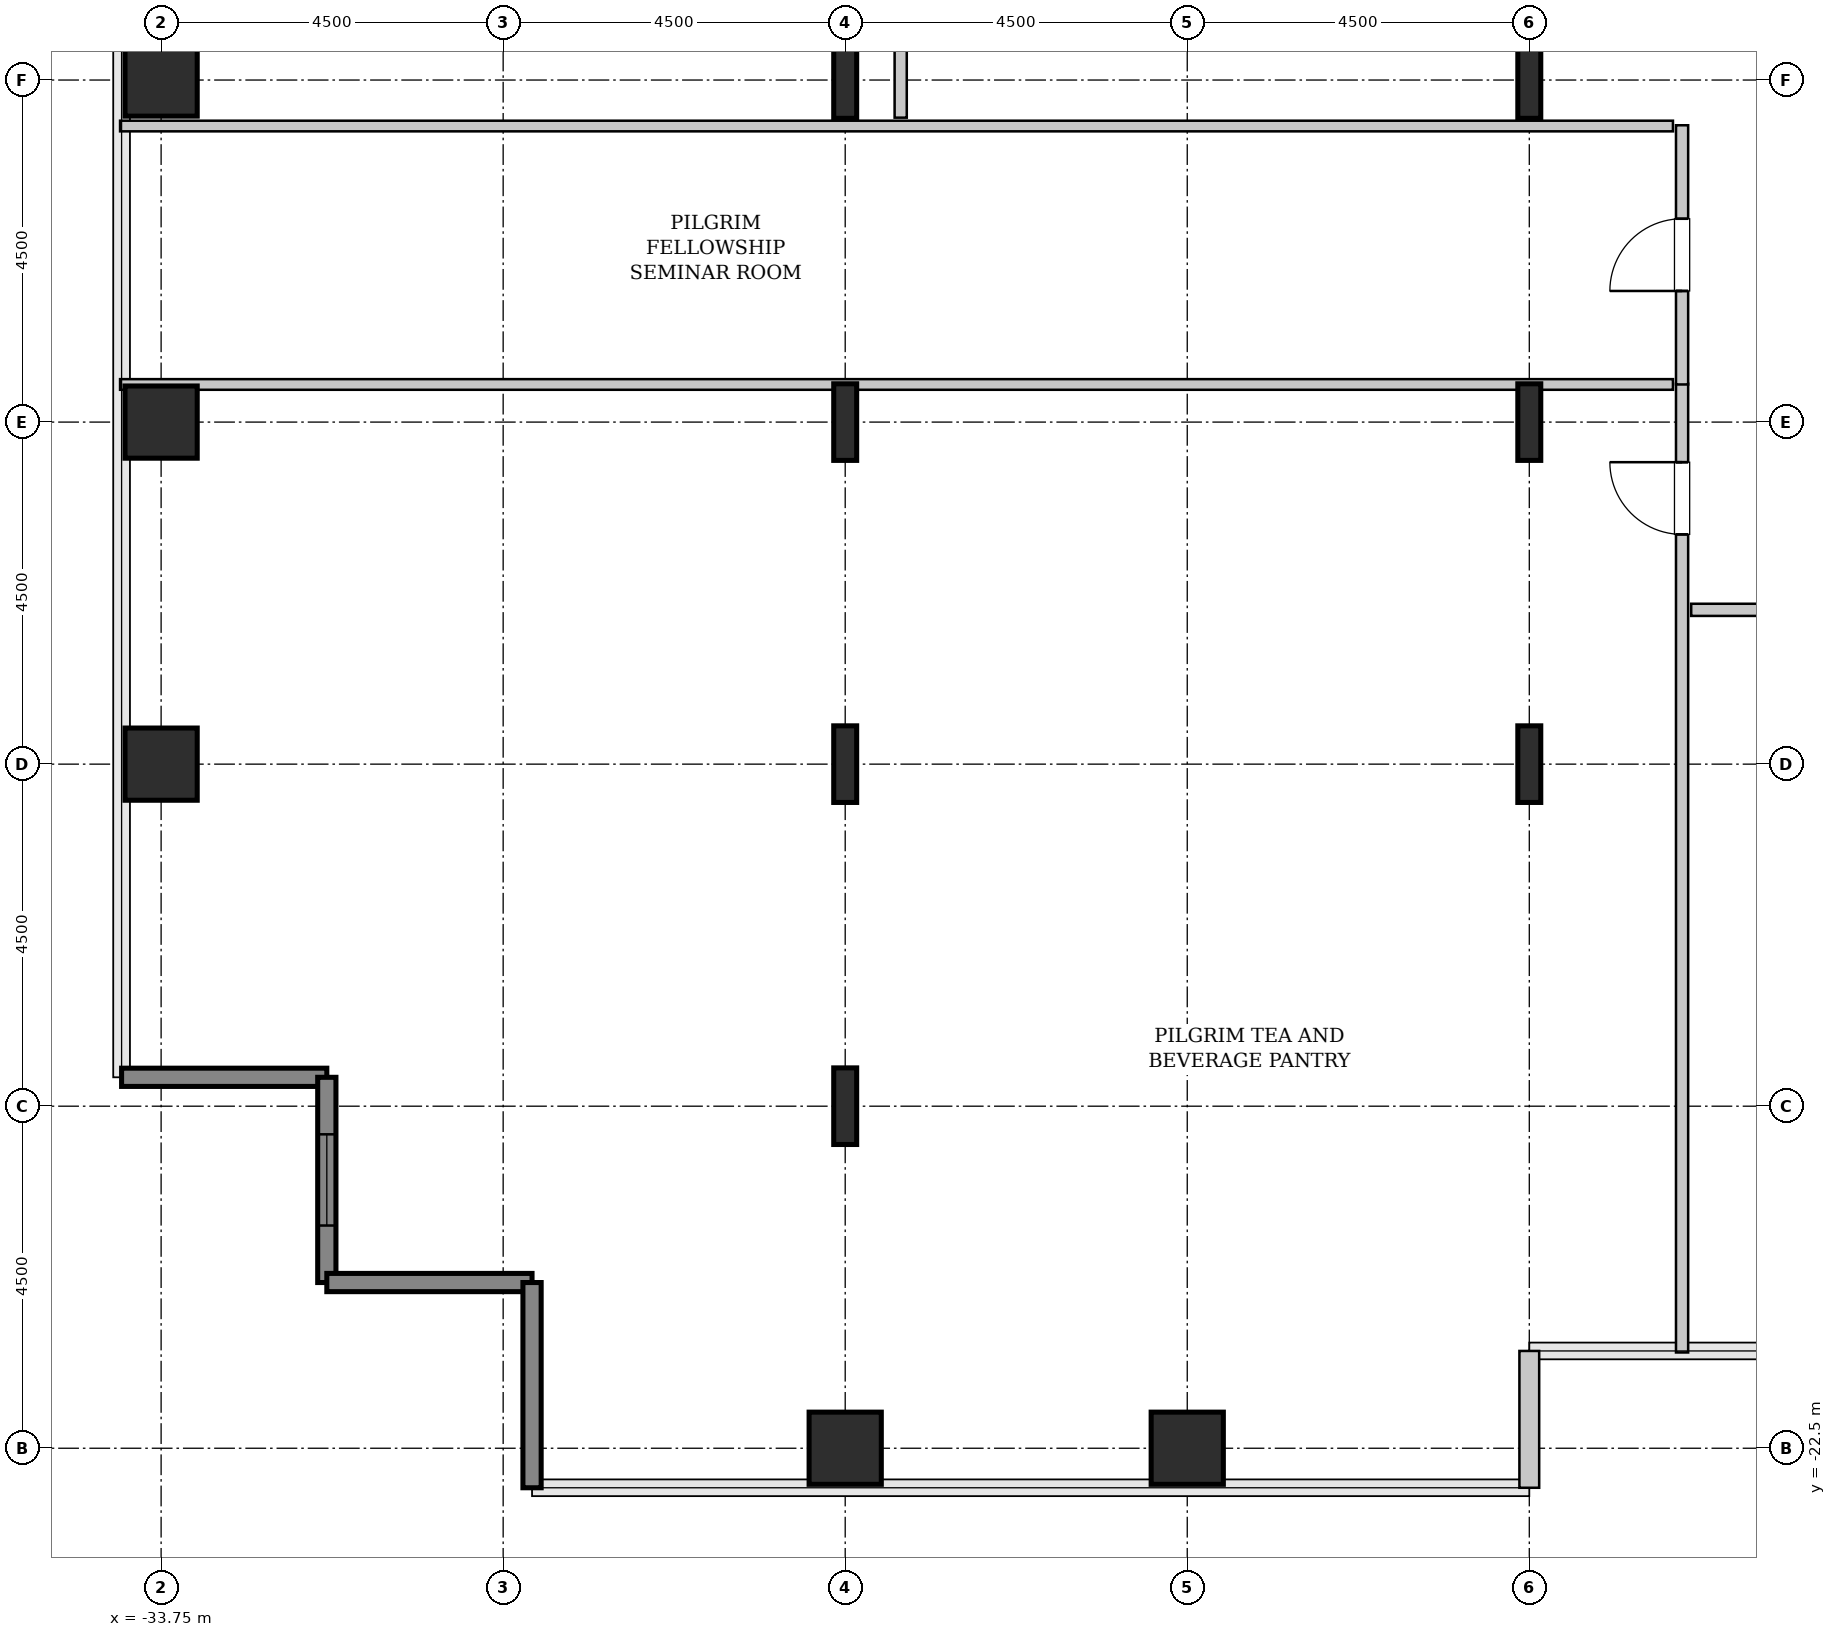
"""IFC4 building model, lengths in metres.
Left out: names, types, materials, properties, quantities, classifications, styles, units other than length and angle.
Written with IfcOpenShell. Run it as: python <this file> out.ifc"""

import sys

from ifc_helpers import new_model, si_unit, direction, frame, frame_2d, origin, origin_2d, place, context, subcontext, project, spatial, rectangle, hollow_rectangle, i_section, extrude, source, transform, mapped, element, fill, save


model = new_model("IFC4")
c1 = context("Model", 3, precision=1e-05, world=origin(), true_north=direction((0.0, 1.0)))
c2 = subcontext(c1, "Body", "Model", "MODEL_VIEW")
j1 = project(units=[si_unit("LENGTHUNIT", "METRE"), si_unit("PLANEANGLEUNIT", "RADIAN")], contexts=[c1])
p1 = place(None, origin())
s1 = spatial("IfcSite", under=j1, at=p1, CompositionType="ELEMENT")
p2 = place(p1, origin())
s2 = spatial("IfcBuilding", under=s1, at=p2, CompositionType="ELEMENT")
p3 = place(p2, frame((0.0, 0.0, 52.0)))
s3 = spatial("IfcBuildingStorey", under=s2, at=p3, CompositionType="ELEMENT", Elevation=52.0)
m1 = source(origin(), c2, "Body", "SweptSolid", [
    extrude(hollow_rectangle(XDim=0.95, YDim=0.95, WallThickness=0.045, InnerFilletRadius=0.045, OuterFilletRadius=0.09, at=origin_2d()), origin(), (0.0, 0.0, 1.0), 3.8),
])
for number, where, z_axis, x_axis in (
    (1, (-33.75, -13.5, 0.0), (0.0, 0.0, 1.0), (1.0, 0.0, 0.0)),
    (2, (-33.75, -9.0, 0.0), (0.0, 0.0, 1.0), (1.0, 0.0, 0.0)),
    (3, (-33.75, -4.5, 0.0), (0.0, 0.0, 1.0), (1.0, 0.0, 0.0)),
    (4, (-24.75, -22.5, 0.0), (0.0, 0.0, 1.0), (1.0, 0.0, 0.0)),
):
    element("IfcColumn", number, at=place(p3, frame(where, z_axis=z_axis, x_axis=x_axis)), inside=s3, PredefinedType="COLUMN", context=c2, shape_type="MappedRepresentation", body=[
        mapped(m1, transform((0.0, 0.0, 0.0), x_axis=(1.0, 0.0, 0.0), y_axis=(0.0, 1.0, 0.0), z_axis=(0.0, 0.0, 1.0), scale=1.0)),
    ])
m2 = source(origin(), c2, "Body", "SweptSolid", [
    extrude(i_section(OverallWidth=0.302, OverallDepth=1.008, WebThickness=0.021, FlangeThickness=0.04, FilletRadius=0.03, at=origin_2d()), origin(), (0.0, 0.0, 1.0), 3.8),
])
for number, where, z_axis, x_axis in (
    (5, (-24.75, -18.0, 0.0), (0.0, 0.0, 1.0), (1.0, 0.0, 0.0)),
    (6, (-24.75, -13.5, 0.0), (0.0, 0.0, 1.0), (1.0, 0.0, 0.0)),
    (7, (-24.75, -9.0, 0.0), (0.0, 0.0, 1.0), (1.0, 0.0, 0.0)),
    (8, (-24.75, -4.5, 0.0), (0.0, 0.0, 1.0), (1.0, 0.0, 0.0)),
):
    element("IfcColumn", number, at=place(p3, frame(where, z_axis=z_axis, x_axis=x_axis)), inside=s3, PredefinedType="COLUMN", context=c2, shape_type="MappedRepresentation", body=[
        mapped(m2, transform((0.0, 0.0, 0.0), x_axis=(1.0, 0.0, 0.0), y_axis=(0.0, 1.0, 0.0), z_axis=(0.0, 0.0, 1.0), scale=1.0)),
    ])
p4 = place(p3, frame((-20.25, -22.5, 0.0), z_axis=(0.0, 0.0, 1.0), x_axis=(1.0, 0.0, 0.0)))
e9 = element("IfcColumn", 9, at=p4, inside=s3, PredefinedType="COLUMN", context=c2, shape_type="MappedRepresentation", body=[
    mapped(m1, transform((0.0, 0.0, 0.0), x_axis=(1.0, 0.0, 0.0), y_axis=(0.0, 1.0, 0.0), z_axis=(0.0, 0.0, 1.0), scale=1.0)),
])
for number, where, z_axis, x_axis in (
    (10, (-15.75, -13.5, 0.0), (0.0, 0.0, 1.0), (1.0, 0.0, 0.0)),
    (11, (-15.75, -9.0, 0.0), (0.0, 0.0, 1.0), (1.0, 0.0, 0.0)),
    (12, (-15.75, -4.5, 0.0), (0.0, 0.0, 1.0), (1.0, 0.0, 0.0)),
):
    element("IfcColumn", number, at=place(p3, frame(where, z_axis=z_axis, x_axis=x_axis)), inside=s3, PredefinedType="COLUMN", context=c2, shape_type="MappedRepresentation", body=[
        mapped(m2, transform((0.0, 0.0, 0.0), x_axis=(1.0, 0.0, 0.0), y_axis=(0.0, 1.0, 0.0), z_axis=(0.0, 0.0, 1.0), scale=1.0)),
    ])
m3 = source(origin(), c2, "Body", "SweptSolid", [
    extrude(rectangle(XDim=2.7, YDim=0.24, at=frame_2d((1.35, 0.0))), origin(), (0.0, 0.0, 1.0), 3.55),
])
p5 = place(p3, frame((-34.27, -17.62, 0.0), z_axis=(0.0, 0.0, 1.0), x_axis=(1.0, 0.0, 0.0)))
e13 = element("IfcWall", 13, at=p5, inside=s3, PredefinedType="SHEAR", context=c2, shape_type="MappedRepresentation", body=[
    mapped(m3, transform((0.0, 0.0, 0.0), x_axis=(1.0, 0.0, 0.0), y_axis=(0.0, 1.0, 0.0), z_axis=(0.0, 0.0, 1.0), scale=1.0)),
])
p6 = place(p3, frame((-31.57, -17.62, 0.0), z_axis=(0.0, 0.0, 1.0), x_axis=(0.0, -1.0, 0.0)))
e14 = element("IfcWall", 14, at=p6, inside=s3, PredefinedType="SHEAR", context=c2, shape_type="MappedRepresentation", body=[
    mapped(m3, transform((0.0, 0.0, 0.0), x_axis=(1.0, 0.0, 0.0), y_axis=(0.0, 1.0, 0.0), z_axis=(0.0, 0.0, 1.0), scale=1.0)),
])
p7 = place(p6, frame((0.75, 0.0, 0.85)))
e15 = element("IfcOpeningElement", 15, at=p7, cuts=e14, PredefinedType="OPENING", context=c2, shape_type="SweptSolid", body=[
    extrude(rectangle(XDim=1.2, YDim=1.8, at=frame_2d((0.6, 0.9))), frame((0.0, 0.13, 0.0), z_axis=(0.0, -1.0, 0.0), x_axis=(1.0, 0.0, 0.0)), (0.0, 0.0, 1.0), 0.26),
])
for number, where, z_axis, x_axis in (
    (16, (-31.57, -20.32, 0.0), (0.0, 0.0, 1.0), (1.0, 0.0, 0.0)),
    (17, (-28.87, -20.32, 0.0), (0.0, 0.0, 1.0), (0.0, -1.0, 0.0)),
):
    element("IfcWall", number, at=place(p3, frame(where, z_axis=z_axis, x_axis=x_axis)), inside=s3, PredefinedType="SHEAR", context=c2, shape_type="MappedRepresentation", body=[
        mapped(m3, transform((0.0, 0.0, 0.0), x_axis=(1.0, 0.0, 0.0), y_axis=(0.0, 1.0, 0.0), z_axis=(0.0, 0.0, 1.0), scale=1.0)),
    ])
m4 = source(origin(), c2, "Body", "SweptSolid", [
    extrude(rectangle(XDim=1.8, YDim=0.26, at=frame_2d((0.9, 0.0))), origin(), (0.0, 0.0, 1.0), 3.55),
])
p8 = place(p3, frame((-15.75, -23.02, 0.0), z_axis=(0.0, 0.0, 1.0), x_axis=(0.0, 1.0, 0.0)))
e18 = element("IfcWall", 18, at=p8, inside=s3, PredefinedType="SOLIDWALL", context=c2, shape_type="MappedRepresentation", body=[
    mapped(m4, transform((0.0, 0.0, 0.0), x_axis=(1.0, 0.0, 0.0), y_axis=(0.0, 1.0, 0.0), z_axis=(0.0, 0.0, 1.0), scale=1.0)),
])
m5 = source(origin(), c2, "Body", "SweptSolid", [
    extrude(rectangle(XDim=12.745, YDim=0.16, at=frame_2d((6.373, 0.0))), origin(), (0.0, 0.0, 1.0), 3.535),
])
p9 = place(p3, frame((-13.74, -21.24, 0.0), z_axis=(0.0, 0.0, 1.0), x_axis=(0.0, 1.0, 0.0)))
e19 = element("IfcWall", 19, at=p9, inside=s3, PredefinedType="PARTITIONING", context=c2, shape_type="MappedRepresentation", body=[
    mapped(m5, transform((0.0, 0.0, 0.0), x_axis=(1.0, 0.0, 0.0), y_axis=(0.0, 1.0, 0.0), z_axis=(0.0, 0.0, 1.0), scale=1.0)),
])
p10 = place(p9, frame((10.762, 0.0, 0.0)))
e20 = element("IfcOpeningElement", 20, at=p10, cuts=e19, PredefinedType="OPENING", context=c2, shape_type="SweptSolid", body=[
    extrude(rectangle(XDim=0.95, YDim=2.1, at=frame_2d((0.475, 1.05))), frame((0.0, 0.09, 0.0), z_axis=(0.0, -1.0, 0.0), x_axis=(1.0, 0.0, 0.0)), (0.0, 0.0, 1.0), 0.18),
])
m6 = source(origin(), c2, "Body", "SweptSolid", [
    extrude(rectangle(XDim=20.43, YDim=0.14, at=frame_2d((10.215, 0.0))), origin(), (0.0, 0.0, 1.0), 2.825),
])
p11 = place(p3, frame((-34.29, -8.505, 0.0), z_axis=(0.0, 0.0, 1.0), x_axis=(1.0, 0.0, 0.0)))
e21 = element("IfcWall", 21, at=p11, inside=s3, PredefinedType="PARTITIONING", context=c2, shape_type="MappedRepresentation", body=[
    mapped(m6, transform((0.0, 0.0, 0.0), x_axis=(1.0, 0.0, 0.0), y_axis=(0.0, 1.0, 0.0), z_axis=(0.0, 0.0, 1.0), scale=1.0)),
])
m7 = source(origin(), c2, "Body", "SweptSolid", [
    extrude(rectangle(XDim=3.41, YDim=0.16, at=frame_2d((1.705, 0.0))), origin(), (0.0, 0.0, 1.0), 3.535),
])
p12 = place(p3, frame((-13.74, -8.505, 0.0), z_axis=(0.0, 0.0, 1.0), x_axis=(0.0, 1.0, 0.0)))
e22 = element("IfcWall", 22, at=p12, inside=s3, PredefinedType="PARTITIONING", context=c2, shape_type="MappedRepresentation", body=[
    mapped(m7, transform((0.0, 0.0, 0.0), x_axis=(1.0, 0.0, 0.0), y_axis=(0.0, 1.0, 0.0), z_axis=(0.0, 0.0, 1.0), scale=1.0)),
])
p13 = place(p12, frame((1.23, 0.0, 0.0)))
e23 = element("IfcOpeningElement", 23, at=p13, cuts=e22, PredefinedType="OPENING", context=c2, shape_type="SweptSolid", body=[
    extrude(rectangle(XDim=0.95, YDim=2.1, at=frame_2d((0.475, 1.05))), frame((0.0, 0.09, 0.0), z_axis=(0.0, -1.0, 0.0), x_axis=(1.0, 0.0, 0.0)), (0.0, 0.0, 1.0), 0.18),
])
m8 = source(origin(), c2, "Body", "SweptSolid", [
    extrude(rectangle(XDim=20.43, YDim=0.14, at=frame_2d((10.215, 0.0))), origin(), (0.0, 0.0, 1.0), 3.535),
])
p14 = place(p3, frame((-34.29, -5.105, 0.0), z_axis=(0.0, 0.0, 1.0), x_axis=(1.0, 0.0, 0.0)))
e24 = element("IfcWall", 24, at=p14, inside=s3, PredefinedType="PARTITIONING", context=c2, shape_type="MappedRepresentation", body=[
    mapped(m8, transform((0.0, 0.0, 0.0), x_axis=(1.0, 0.0, 0.0), y_axis=(0.0, 1.0, 0.0), z_axis=(0.0, 0.0, 1.0), scale=1.0)),
])
m9 = source(origin(), c2, "Body", "SweptSolid", [
    extrude(rectangle(XDim=9.68, YDim=0.16, at=frame_2d((4.84, 0.0))), origin(), (0.0, 0.0, 1.0), 3.535),
])
p15 = place(p3, frame((-24.02, -4.995, 0.0), z_axis=(0.0, 0.0, 1.0), x_axis=(0.0, 1.0, 0.0)))
e25 = element("IfcWall", 25, at=p15, inside=s3, PredefinedType="PARTITIONING", context=c2, shape_type="MappedRepresentation", body=[
    mapped(m9, transform((0.0, 0.0, 0.0), x_axis=(1.0, 0.0, 0.0), y_axis=(0.0, 1.0, 0.0), z_axis=(0.0, 0.0, 1.0), scale=1.0)),
])
p16 = place(p15, frame((2.27, 0.0, 0.0)))
e26 = element("IfcOpeningElement", 26, at=p16, cuts=e25, PredefinedType="OPENING", context=c2, shape_type="SweptSolid", body=[
    extrude(rectangle(XDim=0.95, YDim=2.1, at=frame_2d((0.475, 1.05))), frame((0.0, 0.09, 0.0), z_axis=(0.0, -1.0, 0.0), x_axis=(1.0, 0.0, 0.0)), (0.0, 0.0, 1.0), 0.18),
])
m10 = source(origin(), c2, "Body", "SweptSolid", [
    extrude(rectangle(XDim=5.025, YDim=0.16, at=frame_2d((2.513, 0.0))), origin(), (0.0, 0.0, 1.0), 3.535),
])
p17 = place(p3, frame((-13.62, -11.47, 0.0), z_axis=(0.0, 0.0, 1.0), x_axis=(1.0, 0.0, 0.0)))
e27 = element("IfcWall", 27, at=p17, inside=s3, PredefinedType="PARTITIONING", context=c2, shape_type="MappedRepresentation", body=[
    mapped(m10, transform((0.0, 0.0, 0.0), x_axis=(1.0, 0.0, 0.0), y_axis=(0.0, 1.0, 0.0), z_axis=(0.0, 0.0, 1.0), scale=1.0)),
])
p18 = place(p17, frame((2.038, 0.0, 0.0)))
e28 = element("IfcOpeningElement", 28, at=p18, cuts=e27, PredefinedType="OPENING", context=c2, shape_type="SweptSolid", body=[
    extrude(rectangle(XDim=0.95, YDim=2.1, at=frame_2d((0.475, 1.05))), frame((0.0, 0.09, 0.0), z_axis=(0.0, -1.0, 0.0), x_axis=(1.0, 0.0, 0.0)), (0.0, 0.0, 1.0), 0.18),
])
m11 = source(origin(), c2, "Body", "SweptSolid", [
    extrude(rectangle(XDim=1.2, YDim=1.8, at=frame_2d((0.6, 0.9))), frame((0.0, 0.03, 0.0), z_axis=(0.0, -1.0, 0.0), x_axis=(1.0, 0.0, 0.0)), (0.0, 0.0, 1.0), 0.06),
])
p19 = place(p7, origin())
e29 = element("IfcWindow", 29, at=p19, inside=s3, PartitioningType="SINGLE_PANEL", PredefinedType="WINDOW", context=c2, shape_type="MappedRepresentation", body=[
    mapped(m11, transform((0.0, 0.0, 0.0), x_axis=(1.0, 0.0, 0.0), y_axis=(0.0, 1.0, 0.0), z_axis=(0.0, 0.0, 1.0), scale=1.0)),
])
fill(e15, e29)
m12 = source(origin(), c2, "Body", "SweptSolid", [
    extrude(rectangle(XDim=0.95, YDim=2.1, at=frame_2d((0.475, 1.05))), frame((0.0, 0.025, 0.0), z_axis=(0.0, -1.0, 0.0), x_axis=(1.0, 0.0, 0.0)), (0.0, 0.0, 1.0), 0.05),
])
p20 = place(p10, origin())
e30 = element("IfcDoor", 30, at=p20, inside=s3, OperationType="SINGLE_SWING_RIGHT", PredefinedType="DOOR", context=c2, shape_type="MappedRepresentation", body=[
    mapped(m12, transform((0.0, 0.0, 0.0), x_axis=(1.0, 0.0, 0.0), y_axis=(0.0, 1.0, 0.0), z_axis=(0.0, 0.0, 1.0), scale=1.0)),
])
fill(e20, e30)
p21 = place(p13, origin())
e31 = element("IfcDoor", 31, at=p21, inside=s3, OperationType="SINGLE_SWING_LEFT", PredefinedType="DOOR", context=c2, shape_type="MappedRepresentation", body=[
    mapped(m12, transform((0.0, 0.0, 0.0), x_axis=(1.0, 0.0, 0.0), y_axis=(0.0, 1.0, 0.0), z_axis=(0.0, 0.0, 1.0), scale=1.0)),
])
fill(e23, e31)
save(model, sys.argv[1])
